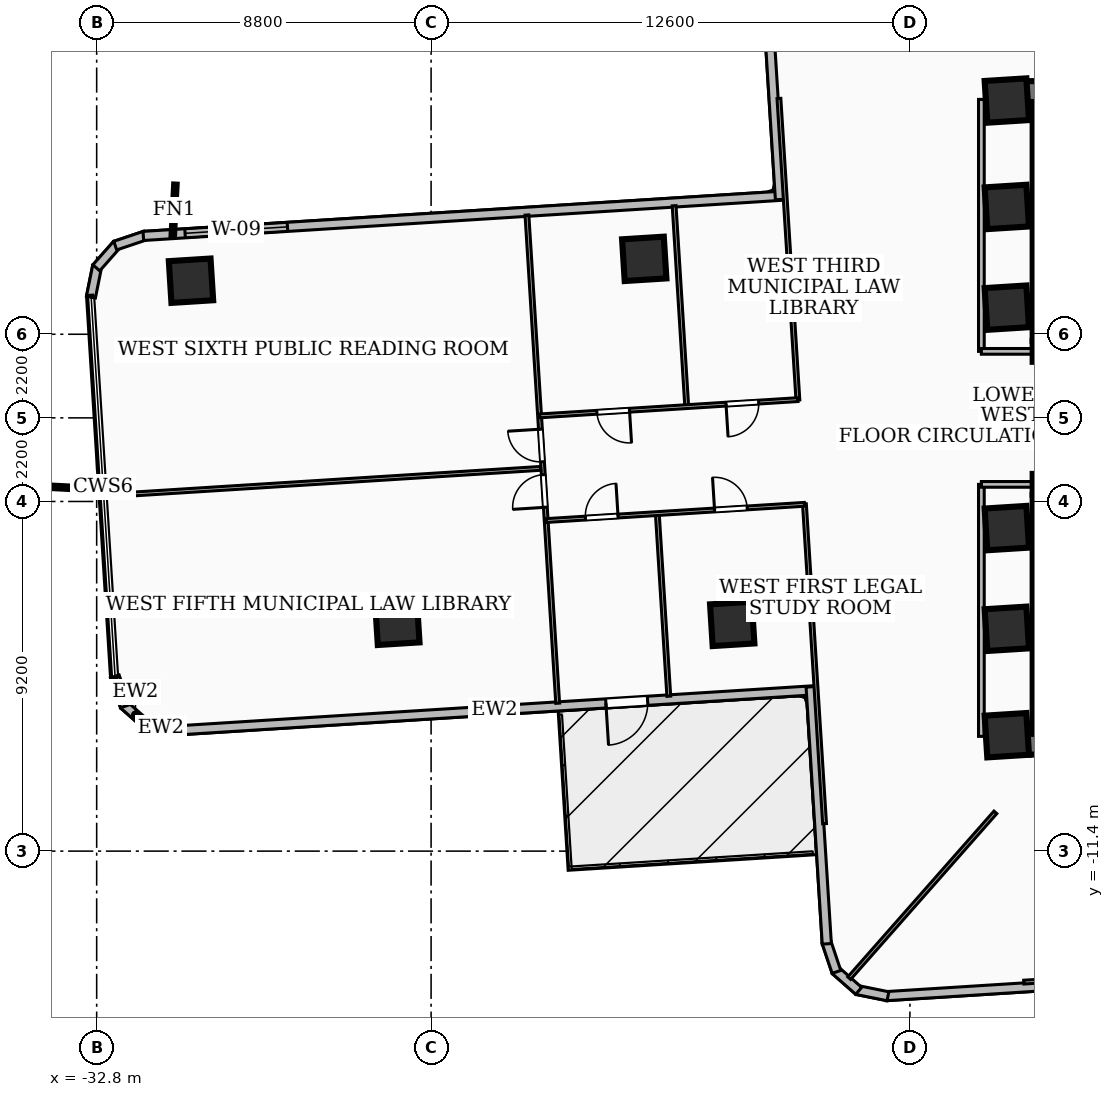
"""IFC4 building model, lengths in metres.
Left out: names, types, materials, properties, quantities, classifications, styles, units other than length and angle.
Written with IfcOpenShell. Run it as: python <this file> out.ifc"""

import sys

from ifc_helpers import new_model, si_unit, direction, frame, frame_2d, origin, origin_2d, place, context, subcontext, project, spatial, rectangle, extrude, element, fill, save


model = new_model("IFC4")
c1 = context("Model", 3, precision=1e-05, world=origin(), true_north=direction((0.0, 1.0)))
c2 = subcontext(c1, "Body", "Model", "MODEL_VIEW")
j1 = project(units=[si_unit("LENGTHUNIT", "METRE"), si_unit("PLANEANGLEUNIT", "RADIAN")], contexts=[c1])
p1 = place(None, origin())
s1 = spatial("IfcSite", under=j1, at=p1, CompositionType="ELEMENT")
p2 = place(p1, origin())
s2 = spatial("IfcBuilding", under=s1, at=p2, CompositionType="ELEMENT")
p3 = place(p2, frame((0.0, 0.0, 53.28)))
s3 = spatial("IfcBuildingStorey", under=s2, at=p3, CompositionType="ELEMENT", Elevation=53.28)
p4 = place(p3, frame((-8.78, 8.585, 0.0), z_axis=(0.0, 0.0, 1.0), x_axis=(1.0, 0.0, 0.0)))
e1 = element("IfcWall", 1, at=p4, inside=s3, PredefinedType="SHEAR", context=c2, shape_type="SweptSolid", body=[
    extrude(rectangle(XDim=17.56, YDim=0.55, at=frame_2d((8.78, 0.0))), origin(), (0.0, 0.0, 1.0), 3.32),
])
p5 = place(p3, frame((8.17, 1.75, 0.0), z_axis=(0.0, 0.0, 1.0), x_axis=(-1.0, 0.0, 0.0)))
e2 = element("IfcWall", 2, at=p5, inside=s3, PredefinedType="SHEAR", context=c2, shape_type="SweptSolid", body=[
    extrude(rectangle(XDim=16.34, YDim=0.55, at=frame_2d((8.17, 0.0))), origin(), (0.0, 0.0, 1.0), 3.32),
])
p6 = place(p5, frame((7.45, 0.0, 0.0)))
e3 = element("IfcOpeningElement", 3, at=p6, cuts=e2, PredefinedType="OPENING", context=c2, shape_type="SweptSolid", body=[
    extrude(rectangle(XDim=1.0, YDim=2.1, at=frame_2d((0.5, 1.05))), frame((0.0, 0.285, 0.0), z_axis=(0.0, -1.0, 0.0), x_axis=(1.0, 0.0, 0.0)), (0.0, 0.0, 1.0), 0.57),
])
p7 = place(p5, frame((3.85, 0.0, 0.0)))
e4 = element("IfcOpeningElement", 4, at=p7, cuts=e2, PredefinedType="OPENING", context=c2, shape_type="SweptSolid", body=[
    extrude(rectangle(XDim=0.9, YDim=2.06, at=frame_2d((0.45, 1.03))), frame((0.0, 0.285, 0.0), z_axis=(0.0, -1.0, 0.0), x_axis=(1.0, 0.0, 0.0)), (0.0, 0.0, 1.0), 0.57),
])
p8 = place(p5, frame((2.35, 0.0, 0.0)))
e5 = element("IfcOpeningElement", 5, at=p8, cuts=e2, PredefinedType="OPENING", context=c2, shape_type="SweptSolid", body=[
    extrude(rectangle(XDim=0.9, YDim=2.06, at=frame_2d((0.45, 1.03))), frame((0.0, 0.285, 0.0), z_axis=(0.0, -1.0, 0.0), x_axis=(1.0, 0.0, 0.0)), (0.0, 0.0, 1.0), 0.57),
])
p9 = place(p5, frame((0.8, 0.0, 0.0)))
e6 = element("IfcOpeningElement", 6, at=p9, cuts=e2, PredefinedType="OPENING", context=c2, shape_type="SweptSolid", body=[
    extrude(rectangle(XDim=0.9, YDim=2.06, at=frame_2d((0.45, 1.03))), frame((0.0, 0.285, 0.0), z_axis=(0.0, -1.0, 0.0), x_axis=(1.0, 0.0, 0.0)), (0.0, 0.0, 1.0), 0.57),
])
p10 = place(p3, frame((-7.895, 2.025, 0.0), z_axis=(0.0, 0.0, 1.0), x_axis=(0.0, 1.0, 0.0)))
e7 = element("IfcWall", 7, at=p10, inside=s3, PredefinedType="SHEAR", context=c2, shape_type="SweptSolid", body=[
    extrude(rectangle(XDim=6.285, YDim=0.55, at=frame_2d((3.143, 0.0))), origin(), (0.0, 0.0, 1.0), 3.32),
])
p11 = place(p3, frame((8.78, -8.585, 0.0), z_axis=(0.0, 0.0, 1.0), x_axis=(-1.0, 0.0, 0.0)))
e8 = element("IfcWall", 8, at=p11, inside=s3, PredefinedType="SHEAR", context=c2, shape_type="SweptSolid", body=[
    extrude(rectangle(XDim=17.56, YDim=0.55, at=frame_2d((8.78, 0.0))), origin(), (0.0, 0.0, 1.0), 3.32),
])
p12 = place(p3, frame((-8.17, -1.75, 0.0), z_axis=(0.0, 0.0, 1.0), x_axis=(1.0, 0.0, 0.0)))
e9 = element("IfcWall", 9, at=p12, inside=s3, PredefinedType="SHEAR", context=c2, shape_type="SweptSolid", body=[
    extrude(rectangle(XDim=16.34, YDim=0.55, at=frame_2d((8.17, 0.0))), origin(), (0.0, 0.0, 1.0), 3.32),
])
p13 = place(p12, frame((7.45, 0.0, 0.0)))
e10 = element("IfcOpeningElement", 10, at=p13, cuts=e9, PredefinedType="OPENING", context=c2, shape_type="SweptSolid", body=[
    extrude(rectangle(XDim=1.0, YDim=2.1, at=frame_2d((0.5, 1.05))), frame((0.0, 0.285, 0.0), z_axis=(0.0, -1.0, 0.0), x_axis=(1.0, 0.0, 0.0)), (0.0, 0.0, 1.0), 0.57),
])
p14 = place(p12, frame((10.965, 0.0, 0.0)))
e11 = element("IfcOpeningElement", 11, at=p14, cuts=e9, PredefinedType="OPENING", context=c2, shape_type="SweptSolid", body=[
    extrude(rectangle(XDim=1.05, YDim=2.15, at=frame_2d((0.525, 1.075))), frame((0.0, 0.285, 0.0), z_axis=(0.0, -1.0, 0.0), x_axis=(1.0, 0.0, 0.0)), (0.0, 0.0, 1.0), 0.57),
])
p15 = place(p12, frame((12.525, 0.0, 0.0)))
e12 = element("IfcOpeningElement", 12, at=p15, cuts=e9, PredefinedType="OPENING", context=c2, shape_type="SweptSolid", body=[
    extrude(rectangle(XDim=1.05, YDim=2.15, at=frame_2d((0.525, 1.075))), frame((0.0, 0.285, 0.0), z_axis=(0.0, -1.0, 0.0), x_axis=(1.0, 0.0, 0.0)), (0.0, 0.0, 1.0), 0.57),
])
p16 = place(p12, frame((14.085, 0.0, 0.0)))
e13 = element("IfcOpeningElement", 13, at=p16, cuts=e9, PredefinedType="OPENING", context=c2, shape_type="SweptSolid", body=[
    extrude(rectangle(XDim=1.05, YDim=2.15, at=frame_2d((0.525, 1.075))), frame((0.0, 0.285, 0.0), z_axis=(0.0, -1.0, 0.0), x_axis=(1.0, 0.0, 0.0)), (0.0, 0.0, 1.0), 0.57),
])
p17 = place(p3, frame((-7.895, -8.31, 0.0), z_axis=(0.0, 0.0, 1.0), x_axis=(0.0, 1.0, 0.0)))
e14 = element("IfcWall", 14, at=p17, inside=s3, PredefinedType="SHEAR", context=c2, shape_type="SweptSolid", body=[
    extrude(rectangle(XDim=6.285, YDim=0.55, at=frame_2d((3.143, 0.0))), origin(), (0.0, 0.0, 1.0), 3.32),
])
for number, where, z_axis, x_axis in (
    (15, (-8.85, -5.55, 0.0), (0.0, 0.0, 1.0), (0.998, 0.063, 0.0)),
    (16, (-8.85, -2.9, 0.0), (0.0, 0.0, 1.0), (0.998, 0.063, 0.0)),
    (17, (-8.85, 2.9, 0.0), (0.0, 0.0, 1.0), (0.998, 0.063, 0.0)),
    (18, (-8.85, 5.55, 0.0), (0.0, 0.0, 1.0), (0.998, 0.063, 0.0)),
    (19, (-8.85, 8.35, 0.0), (0.0, 0.0, 1.0), (0.998, 0.063, 0.0)),
    (20, (-8.85, -8.35, 0.0), (0.0, 0.0, 1.0), (0.998, 0.063, 0.0)),
    (21, (-18.391, 4.184, 0.0), (0.0, 0.0, 1.0), (0.998, 0.063, 0.0)),
    (22, (-16.076, -5.421, 0.0), (0.0, 0.0, 1.0), (0.998, 0.063, 0.0)),
    (23, (-30.318, 3.609, 0.0), (0.0, 0.0, 1.0), (0.998, 0.063, 0.0)),
    (24, (-24.888, -5.393, 0.0), (0.0, 0.0, 1.0), (0.998, 0.063, 0.0)),
):
    element("IfcColumn", number, at=place(p3, frame(where, z_axis=z_axis, x_axis=x_axis)), inside=s3, PredefinedType="COLUMN", context=c2, shape_type="SweptSolid", body=[
        extrude(rectangle(XDim=1.1, YDim=1.1, at=origin_2d()), origin(), (0.0, 0.0, 1.0), 3.6),
    ])
p18 = place(p3, frame((-13.911, -7.167, 0.0), z_axis=(0.0, 0.0, 1.0), x_axis=(-0.99802143782, -0.062874554885, 0.0)))
e25 = element("IfcWall", 25, at=p18, inside=s3, PredefinedType="SOLIDWALL", context=c2, shape_type="SweptSolid", body=[
    extrude(rectangle(XDim=16.875, YDim=0.24, at=frame_2d((8.438, 0.0))), origin(), (0.0, 0.0, 1.0), 3.32),
])
p19 = place(p18, frame((4.4, 0.0, 0.0)))
e26 = element("IfcOpeningElement", 26, at=p19, cuts=e25, PredefinedType="OPENING", context=c2, shape_type="SweptSolid", body=[
    extrude(rectangle(XDim=1.1, YDim=2.1, at=frame_2d((0.55, 1.05))), frame((0.0, 0.13, 0.0), z_axis=(0.0, -1.0, 0.0), x_axis=(1.0, 0.0, 0.0)), (0.0, 0.0, 1.0), 0.26),
])
p20 = place(p3, frame((-30.703, -8.231, 0.0), z_axis=(0.0, 0.0, 1.0), x_axis=(-0.980115061473, 0.198430003461, 0.0)))
e27 = element("IfcWall", 27, at=p20, inside=s3, PredefinedType="SOLIDWALL", context=c2, shape_type="SweptSolid", body=[
    extrude(rectangle(XDim=0.832, YDim=0.24, at=frame_2d((0.416, 0.0))), origin(), (0.0, 0.0, 1.0), 3.32),
])
p21 = place(p3, frame((-31.474, -8.088, 0.0), z_axis=(0.0, 0.0, 1.0), x_axis=(-0.749934065497, 0.661512582954, 0.0)))
e28 = element("IfcWall", 28, at=p21, inside=s3, PredefinedType="SOLIDWALL", context=c2, shape_type="SweptSolid", body=[
    extrude(rectangle(XDim=0.814, YDim=0.24, at=frame_2d((0.407, 0.0))), origin(), (0.0, 0.0, 1.0), 3.32),
])
p22 = place(p3, frame((-32.058, -7.59, 0.0), z_axis=(0.0, 0.0, 1.0), x_axis=(-0.318960399163, 0.947768043229, 0.0)))
e29 = element("IfcWall", 29, at=p22, inside=s3, PredefinedType="SOLIDWALL", context=c2, shape_type="SweptSolid", body=[
    extrude(rectangle(XDim=0.831, YDim=0.24, at=frame_2d((0.415, 0.0))), origin(), (0.0, 0.0, 1.0), 3.32),
])
p23 = place(p3, frame((-32.951, 3.177, 0.0), z_axis=(0.0, 0.0, 1.0), x_axis=(0.197076231398, 0.980388167522, 0.0)))
e30 = element("IfcWall", 30, at=p23, inside=s3, PredefinedType="SOLIDWALL", context=c2, shape_type="SweptSolid", body=[
    extrude(rectangle(XDim=0.831, YDim=0.24, at=frame_2d((0.416, 0.0))), origin(), (0.0, 0.0, 1.0), 3.32),
])
p24 = place(p3, frame((-32.809, 3.948, 0.0), z_axis=(0.0, 0.0, 1.0), x_axis=(0.661532449753, 0.749916540639, 0.0)))
e31 = element("IfcWall", 31, at=p24, inside=s3, PredefinedType="SOLIDWALL", context=c2, shape_type="SweptSolid", body=[
    extrude(rectangle(XDim=0.815, YDim=0.24, at=frame_2d((0.407, 0.0))), origin(), (0.0, 0.0, 1.0), 3.32),
])
p25 = place(p3, frame((-32.311, 4.532, 0.0), z_axis=(0.0, 0.0, 1.0), x_axis=(0.94779876374, 0.318869100812, 0.0)))
e32 = element("IfcWall", 32, at=p25, inside=s3, PredefinedType="SOLIDWALL", context=c2, shape_type="SweptSolid", body=[
    extrude(rectangle(XDim=0.832, YDim=0.24, at=frame_2d((0.416, 0.0))), origin(), (0.0, 0.0, 1.0), 3.32),
])
p26 = place(p3, frame((-31.572, 4.787, 0.0), z_axis=(0.0, 0.0, 1.0), x_axis=(0.998025974342, 0.062802504235, 0.0)))
e33 = element("IfcWall", 33, at=p26, inside=s3, PredefinedType="SOLIDWALL", context=c2, shape_type="SweptSolid", body=[
    extrude(rectangle(XDim=16.875, YDim=0.24, at=frame_2d((8.438, 0.0))), origin(), (0.0, 0.0, 1.0), 3.32),
])
p27 = place(p26, frame((1.1, 0.0, 0.85)))
e34 = element("IfcOpeningElement", 34, at=p27, cuts=e33, PredefinedType="OPENING", context=c2, shape_type="SweptSolid", body=[
    extrude(rectangle(XDim=2.7, YDim=1.65, at=frame_2d((1.35, 0.825))), frame((0.0, 0.13, 0.0), z_axis=(0.0, -1.0, 0.0), x_axis=(1.0, 0.0, 0.0)), (0.0, 0.0, 1.0), 0.26),
])
p28 = place(p3, frame((-14.82, 5.745, 0.0), z_axis=(0.0, 0.0, 1.0), x_axis=(-0.062902193405, 0.998019696231, 0.0)))
e35 = element("IfcWall", 35, at=p28, inside=s3, PredefinedType="SOLIDWALL", context=c2, shape_type="SweptSolid", body=[
    extrude(rectangle(XDim=6.295, YDim=0.24, at=frame_2d((3.148, 0.0))), origin(), (0.0, 0.0, 1.0), 3.32),
])
p29 = place(p3, frame((-5.745, -14.82, 0.0), z_axis=(0.0, 0.0, 1.0), x_axis=(-0.998019696231, -0.062902193405, 0.0)))
e36 = element("IfcWall", 36, at=p29, inside=s3, PredefinedType="SOLIDWALL", context=c2, shape_type="SweptSolid", body=[
    extrude(rectangle(XDim=6.295, YDim=0.24, at=frame_2d((3.148, 0.0))), origin(), (0.0, 0.0, 1.0), 2.401),
])
p30 = place(p3, frame((-11.978, -15.219, 0.0), z_axis=(0.0, 0.0, 1.0), x_axis=(-0.980057147523, 0.198715846348, 0.0)))
e37 = element("IfcWall", 37, at=p30, inside=s3, PredefinedType="SOLIDWALL", context=c2, shape_type="SweptSolid", body=[
    extrude(rectangle(XDim=0.831, YDim=0.24, at=frame_2d((0.415, 0.0))), origin(), (0.0, 0.0, 1.0), 3.32),
])
p31 = place(p3, frame((-12.748, -15.076, 0.0), z_axis=(0.0, 0.0, 1.0), x_axis=(-0.750588777208, 0.66076961759, 0.0)))
e38 = element("IfcWall", 38, at=p31, inside=s3, PredefinedType="SOLIDWALL", context=c2, shape_type="SweptSolid", body=[
    extrude(rectangle(XDim=0.815, YDim=0.24, at=frame_2d((0.408, 0.0))), origin(), (0.0, 0.0, 1.0), 3.32),
])
p32 = place(p3, frame((-13.333, -14.578, 0.0), z_axis=(0.0, 0.0, 1.0), x_axis=(-0.317992207862, 0.948093326492, 0.0)))
e39 = element("IfcWall", 39, at=p32, inside=s3, PredefinedType="SOLIDWALL", context=c2, shape_type="SweptSolid", body=[
    extrude(rectangle(XDim=0.83, YDim=0.24, at=frame_2d((0.415, 0.0))), origin(), (0.0, 0.0, 1.0), 3.32),
])
p33 = place(p3, frame((-13.587, -13.84, 0.0), z_axis=(0.0, 0.0, 1.0), x_axis=(-0.062867237505, 0.998021898782, 0.0)))
e40 = element("IfcWall", 40, at=p33, inside=s3, PredefinedType="SOLIDWALL", context=c2, shape_type="SweptSolid", body=[
    extrude(rectangle(XDim=6.777, YDim=0.24, at=frame_2d((3.388, 0.0))), origin(), (0.0, 0.0, 1.0), 3.32),
])
p34 = place(p3, frame((-9.52, 1.75, 0.0), z_axis=(0.0, 0.0, 1.0), x_axis=(0.0, 1.0, 0.0)))
e41 = element("IfcWall", 41, at=p34, inside=s3, PredefinedType="PARTITIONING", context=c2, shape_type="SweptSolid", body=[
    extrude(rectangle(XDim=6.63, YDim=0.15, at=frame_2d((3.315, 0.0))), origin(), (0.0, 0.0, 1.0), 2.401),
])
p35 = place(p3, frame((-7.85, 1.75, 0.0), z_axis=(0.0, 0.0, 1.0), x_axis=(-1.0, 0.0, 0.0)))
e42 = element("IfcWall", 42, at=p35, inside=s3, PredefinedType="PARTITIONING", context=c2, shape_type="SweptSolid", body=[
    extrude(rectangle(XDim=1.67, YDim=0.15, at=frame_2d((0.835, 0.0))), origin(), (0.0, 0.0, 1.0), 2.385),
])
p36 = place(p3, frame((-9.52, -8.38, 0.0), z_axis=(0.0, 0.0, 1.0), x_axis=(0.0, 1.0, 0.0)))
e43 = element("IfcWall", 43, at=p36, inside=s3, PredefinedType="PARTITIONING", context=c2, shape_type="SweptSolid", body=[
    extrude(rectangle(XDim=6.63, YDim=0.15, at=frame_2d((3.315, 0.0))), origin(), (0.0, 0.0, 1.0), 2.401),
])
p37 = place(p3, frame((-7.85, -1.75, 0.0), z_axis=(0.0, 0.0, 1.0), x_axis=(-1.0, 0.0, 0.0)))
e44 = element("IfcWall", 44, at=p37, inside=s3, PredefinedType="PARTITIONING", context=c2, shape_type="SweptSolid", body=[
    extrude(rectangle(XDim=1.67, YDim=0.15, at=frame_2d((0.835, 0.0))), origin(), (0.0, 0.0, 1.0), 2.385),
])
p38 = place(p3, frame((-9.151, -10.38, 0.0), z_axis=(0.0, 0.0, 1.0), x_axis=(-0.661373124857, -0.750057057641, 0.0)))
e45 = element("IfcWall", 45, at=p38, inside=s3, PredefinedType="PARTITIONING", context=c2, shape_type="SweptSolid", body=[
    extrude(rectangle(XDim=5.817, YDim=0.1, at=frame_2d((2.908, 0.0))), origin(), (0.0, 0.0, 1.0), 3.32),
])
p39 = place(p3, frame((-14.176, -2.265, 0.0), z_axis=(0.0, 0.0, 1.0), x_axis=(0.062875924382, -0.998021351542, 0.0)))
e46 = element("IfcWall", 46, at=p39, inside=s3, PredefinedType="PARTITIONING", context=c2, shape_type="SweptSolid", body=[
    extrude(rectangle(XDim=8.43, YDim=0.1, at=frame_2d((4.215, 0.0))), origin(), (0.0, 0.0, 1.0), 2.401),
])
p40 = place(p3, frame((-14.847, 8.404, 0.0), z_axis=(0.0, 0.0, 1.0), x_axis=(0.062772139706, -0.998027884619, 0.0)))
e47 = element("IfcWall", 47, at=p40, inside=s3, PredefinedType="PARTITIONING", context=c2, shape_type="SweptSolid", body=[
    extrude(rectangle(XDim=7.95, YDim=0.1, at=frame_2d((3.975, 0.0))), origin(), (0.0, 0.0, 1.0), 2.401),
])
p41 = place(p3, frame((-18.046, -2.538, 0.0), z_axis=(0.0, 0.0, 1.0), x_axis=(0.062723771889, -0.998030925593, 0.0)))
e48 = element("IfcWall", 48, at=p41, inside=s3, PredefinedType="PARTITIONING", context=c2, shape_type="SweptSolid", body=[
    extrude(rectangle(XDim=4.795, YDim=0.1, at=frame_2d((2.398, 0.0))), origin(), (0.0, 0.0, 1.0), 2.401),
])
p42 = place(p3, frame((-17.605, 5.581, 0.0), z_axis=(0.0, 0.0, 1.0), x_axis=(0.0627528266, -0.998029099152, 0.0)))
e49 = element("IfcWall", 49, at=p42, inside=s3, PredefinedType="PARTITIONING", context=c2, shape_type="SweptSolid", body=[
    extrude(rectangle(XDim=5.276, YDim=0.1, at=frame_2d((2.638, 0.0))), origin(), (0.0, 0.0, 1.0), 2.401),
])
p43 = place(p3, frame((-20.972, -2.702, 0.0), z_axis=(0.0, 0.0, 1.0), x_axis=(0.998032440214, 0.062699667311, 0.0)))
e50 = element("IfcWall", 50, at=p43, inside=s3, PredefinedType="PARTITIONING", context=c2, shape_type="SweptSolid", body=[
    extrude(rectangle(XDim=6.81, YDim=0.1, at=frame_2d((3.405, 0.0))), origin(), (0.0, 0.0, 1.0), 3.32),
])
p44 = place(p43, frame((4.44, 0.0, 0.0)))
e51 = element("IfcOpeningElement", 51, at=p44, cuts=e50, PredefinedType="OPENING", context=c2, shape_type="SweptSolid", body=[
    extrude(rectangle(XDim=0.86, YDim=2.04, at=frame_2d((0.43, 1.02))), frame((0.0, 0.06, 0.0), z_axis=(0.0, -1.0, 0.0), x_axis=(1.0, 0.0, 0.0)), (0.0, 0.0, 1.0), 0.12),
])
p45 = place(p43, frame((1.035, 0.0, 0.0)))
e52 = element("IfcOpeningElement", 52, at=p45, cuts=e50, PredefinedType="OPENING", context=c2, shape_type="SweptSolid", body=[
    extrude(rectangle(XDim=0.86, YDim=2.04, at=frame_2d((0.43, 1.02))), frame((0.0, 0.06, 0.0), z_axis=(0.0, -1.0, 0.0), x_axis=(1.0, 0.0, 0.0)), (0.0, 0.0, 1.0), 0.12),
])
p46 = place(p3, frame((-14.348, 0.48, 0.0), z_axis=(0.0, 0.0, 1.0), x_axis=(-0.998023598481, -0.062840248847, 0.0)))
e53 = element("IfcWall", 53, at=p46, inside=s3, PredefinedType="PARTITIONING", context=c2, shape_type="SweptSolid", body=[
    extrude(rectangle(XDim=6.811, YDim=0.1, at=frame_2d((3.405, 0.0))), origin(), (0.0, 0.0, 1.0), 3.32),
])
p47 = place(p46, frame((1.035, 0.0, 0.0)))
e54 = element("IfcOpeningElement", 54, at=p47, cuts=e53, PredefinedType="OPENING", context=c2, shape_type="SweptSolid", body=[
    extrude(rectangle(XDim=0.86, YDim=2.04, at=frame_2d((0.43, 1.02))), frame((0.0, 0.06, 0.0), z_axis=(0.0, -1.0, 0.0), x_axis=(1.0, 0.0, 0.0)), (0.0, 0.0, 1.0), 0.12),
])
p48 = place(p46, frame((4.44, 0.0, 0.0)))
e55 = element("IfcOpeningElement", 55, at=p48, cuts=e53, PredefinedType="OPENING", context=c2, shape_type="SweptSolid", body=[
    extrude(rectangle(XDim=0.86, YDim=2.04, at=frame_2d((0.43, 1.02))), frame((0.0, 0.06, 0.0), z_axis=(0.0, -1.0, 0.0), x_axis=(1.0, 0.0, 0.0)), (0.0, 0.0, 1.0), 0.12),
])
p49 = place(p3, frame((-21.118, -1.329, 0.0), z_axis=(0.0, 0.0, 1.0), x_axis=(-0.998026908856, -0.062787651642, 0.0)))
e56 = element("IfcWall", 56, at=p49, inside=s3, PredefinedType="PARTITIONING", context=c2, shape_type="SweptSolid", body=[
    extrude(rectangle(XDim=11.436, YDim=0.1, at=frame_2d((5.718, 0.0))), origin(), (0.0, 0.0, 1.0), 2.812),
])
p50 = place(p3, frame((-20.669, -7.508, 0.0), z_axis=(0.0, 0.0, 1.0), x_axis=(-0.062863651969, 0.998022124635, 0.0)))
e57 = element("IfcWall", 57, at=p50, inside=s3, PredefinedType="PARTITIONING", context=c2, shape_type="SweptSolid", body=[
    extrude(rectangle(XDim=12.87, YDim=0.1, at=frame_2d((6.435, 0.0))), origin(), (0.0, 0.0, 1.0), 2.401),
])
p51 = place(p50, frame((6.365, 0.0, 0.0)))
e58 = element("IfcOpeningElement", 58, at=p51, cuts=e57, PredefinedType="OPENING", context=c2, shape_type="SweptSolid", body=[
    extrude(rectangle(XDim=0.86, YDim=2.04, at=frame_2d((0.43, 1.02))), frame((0.0, 0.06, 0.0), z_axis=(0.0, -1.0, 0.0), x_axis=(1.0, 0.0, 0.0)), (0.0, 0.0, 1.0), 0.12),
])
p52 = place(p50, frame((5.165, 0.0, 0.0)))
e59 = element("IfcOpeningElement", 59, at=p52, cuts=e57, PredefinedType="OPENING", context=c2, shape_type="SweptSolid", body=[
    extrude(rectangle(XDim=0.86, YDim=2.04, at=frame_2d((0.43, 1.02))), frame((0.0, 0.06, 0.0), z_axis=(0.0, -1.0, 0.0), x_axis=(1.0, 0.0, 0.0)), (0.0, 0.0, 1.0), 0.12),
])
p53 = place(p3, frame((-8.404, -14.847, 0.0), z_axis=(0.0, 0.0, 1.0), x_axis=(0.998027884619, 0.062772139706, 0.0)))
e60 = element("IfcWall", 60, at=p53, inside=s3, PredefinedType="PARTITIONING", context=c2, shape_type="SweptSolid", body=[
    extrude(rectangle(XDim=7.95, YDim=0.1, at=frame_2d((3.975, 0.0))), origin(), (0.0, 0.0, 1.0), 2.401),
])
p54 = place(p19, origin())
e61 = element("IfcDoor", 61, at=p54, inside=s3, OperationType="SINGLE_SWING_RIGHT", PredefinedType="DOOR", context=c2, shape_type="SweptSolid", body=[
    extrude(rectangle(XDim=1.1, YDim=2.1, at=frame_2d((0.55, 1.05))), frame((0.0, 0.025, 0.0), z_axis=(0.0, -1.0, 0.0), x_axis=(1.0, 0.0, 0.0)), (0.0, 0.0, 1.0), 0.05),
])
fill(e26, e61)
p55 = place(p27, origin())
e62 = element("IfcWindow", 62, at=p55, inside=s3, PartitioningType="SINGLE_PANEL", PredefinedType="WINDOW", context=c2, shape_type="SweptSolid", body=[
    extrude(rectangle(XDim=2.7, YDim=1.65, at=frame_2d((1.35, 0.825))), frame((0.0, 0.03, 0.0), z_axis=(0.0, -1.0, 0.0), x_axis=(1.0, 0.0, 0.0)), (0.0, 0.0, 1.0), 0.06),
])
fill(e34, e62)
p56 = place(p44, origin())
e63 = element("IfcDoor", 63, at=p56, inside=s3, OperationType="SINGLE_SWING_LEFT", PredefinedType="DOOR", context=c2, shape_type="SweptSolid", body=[
    extrude(rectangle(XDim=0.86, YDim=2.04, at=frame_2d((0.43, 1.02))), frame((0.0, 0.025, 0.0), z_axis=(0.0, -1.0, 0.0), x_axis=(1.0, 0.0, 0.0)), (0.0, 0.0, 1.0), 0.05),
])
fill(e51, e63)
p57 = place(p45, origin())
e64 = element("IfcDoor", 64, at=p57, inside=s3, OperationType="SINGLE_SWING_RIGHT", PredefinedType="DOOR", context=c2, shape_type="SweptSolid", body=[
    extrude(rectangle(XDim=0.86, YDim=2.04, at=frame_2d((0.43, 1.02))), frame((0.0, 0.025, 0.0), z_axis=(0.0, -1.0, 0.0), x_axis=(1.0, 0.0, 0.0)), (0.0, 0.0, 1.0), 0.05),
])
fill(e52, e64)
p58 = place(p47, origin())
e65 = element("IfcDoor", 65, at=p58, inside=s3, OperationType="SINGLE_SWING_RIGHT", PredefinedType="DOOR", context=c2, shape_type="SweptSolid", body=[
    extrude(rectangle(XDim=0.86, YDim=2.04, at=frame_2d((0.43, 1.02))), frame((0.0, 0.025, 0.0), z_axis=(0.0, -1.0, 0.0), x_axis=(1.0, 0.0, 0.0)), (0.0, 0.0, 1.0), 0.05),
])
fill(e54, e65)
p59 = place(p48, origin())
e66 = element("IfcDoor", 66, at=p59, inside=s3, OperationType="SINGLE_SWING_LEFT", PredefinedType="DOOR", context=c2, shape_type="SweptSolid", body=[
    extrude(rectangle(XDim=0.86, YDim=2.04, at=frame_2d((0.43, 1.02))), frame((0.0, 0.025, 0.0), z_axis=(0.0, -1.0, 0.0), x_axis=(1.0, 0.0, 0.0)), (0.0, 0.0, 1.0), 0.05),
])
fill(e55, e66)
p60 = place(p51, origin())
e67 = element("IfcDoor", 67, at=p60, inside=s3, OperationType="SINGLE_SWING_RIGHT", PredefinedType="DOOR", context=c2, shape_type="SweptSolid", body=[
    extrude(rectangle(XDim=0.86, YDim=2.04, at=frame_2d((0.43, 1.02))), frame((0.0, 0.025, 0.0), z_axis=(0.0, -1.0, 0.0), x_axis=(1.0, 0.0, 0.0)), (0.0, 0.0, 1.0), 0.05),
])
fill(e58, e67)
p61 = place(p52, origin())
e68 = element("IfcDoor", 68, at=p61, inside=s3, OperationType="SINGLE_SWING_LEFT", PredefinedType="DOOR", context=c2, shape_type="SweptSolid", body=[
    extrude(rectangle(XDim=0.86, YDim=2.04, at=frame_2d((0.43, 1.02))), frame((0.0, 0.025, 0.0), z_axis=(0.0, -1.0, 0.0), x_axis=(1.0, 0.0, 0.0)), (0.0, 0.0, 1.0), 0.05),
])
fill(e59, e68)
save(model, sys.argv[1])
